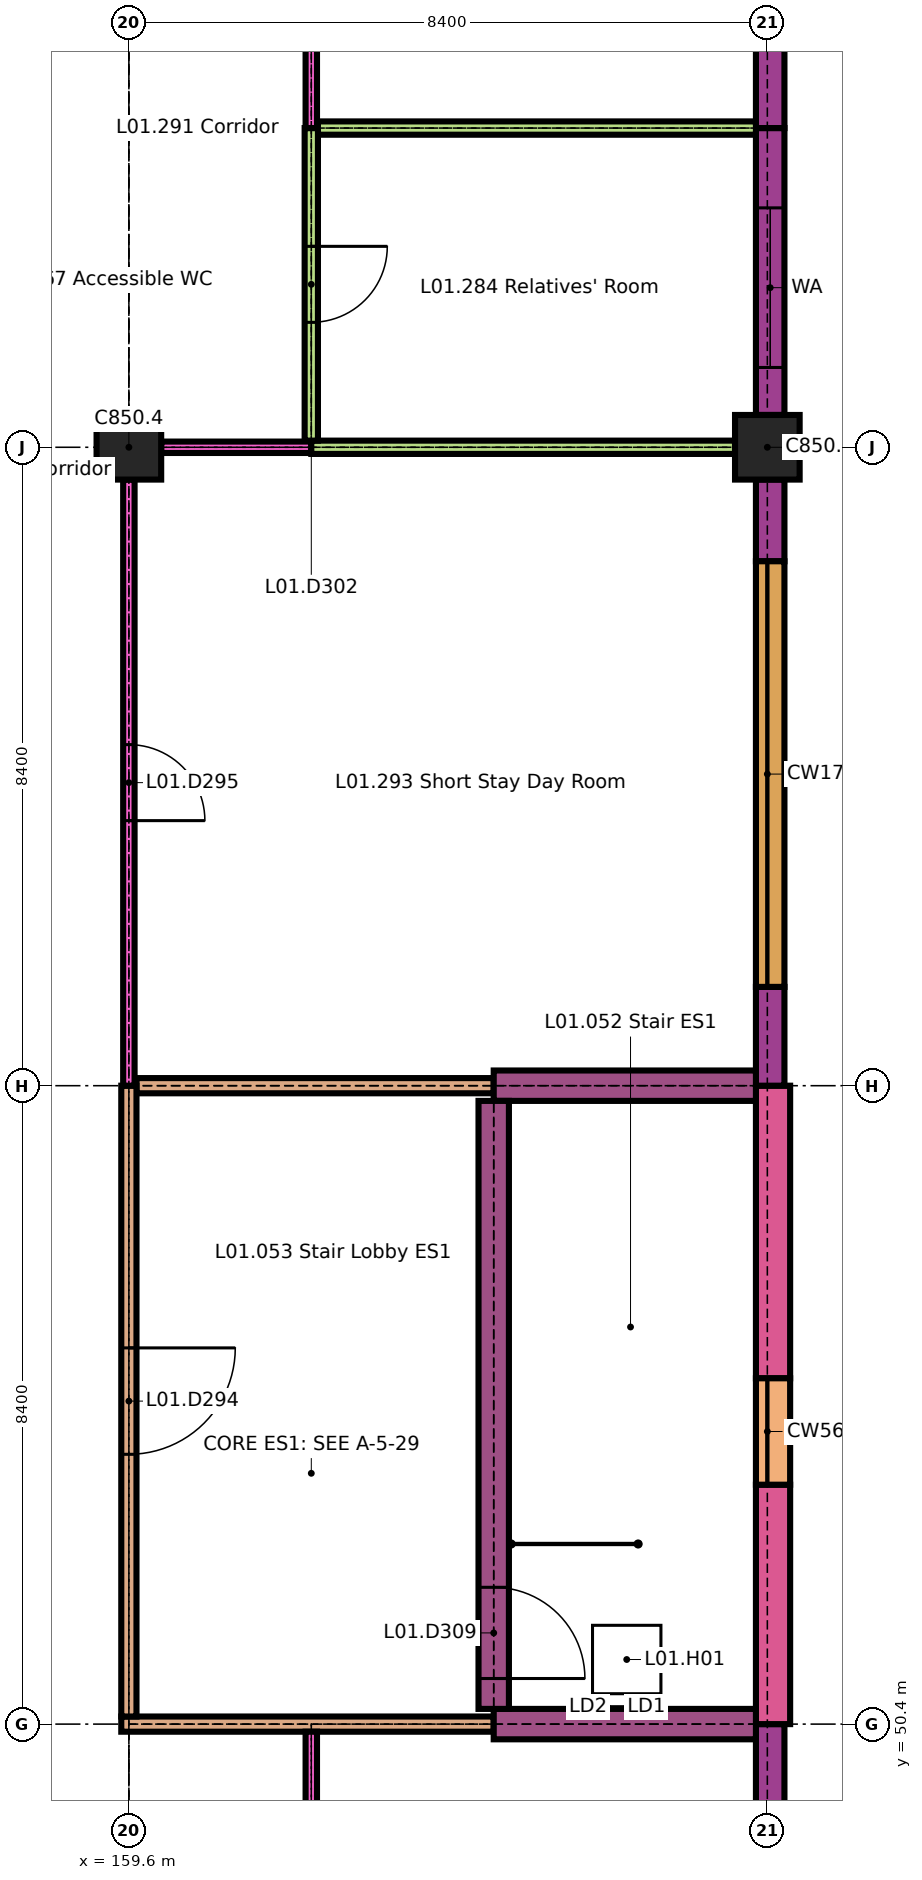
"""IFC4 building model, lengths in metres.
Left out: names, types, materials, properties, quantities, classifications, styles, units other than length and angle.
Written with IfcOpenShell. Run it as: python <this file> out.ifc"""

import sys

from ifc_helpers import new_model, si_unit, direction, frame, frame_2d, origin, origin_2d, place, context, subcontext, project, spatial, rectangle, extrude, element, fill, save


model = new_model("IFC4")
c1 = context("Model", 3, precision=1e-05, world=origin(), true_north=direction((0.0, 1.0)))
c2 = subcontext(c1, "Body", "Model", "MODEL_VIEW")
j1 = project(units=[si_unit("LENGTHUNIT", "METRE"), si_unit("PLANEANGLEUNIT", "RADIAN")], contexts=[c1])
p1 = place(None, origin())
s1 = spatial("IfcSite", under=j1, at=p1, CompositionType="ELEMENT")
p2 = place(p1, origin())
s2 = spatial("IfcBuilding", under=s1, at=p2, CompositionType="ELEMENT")
p3 = place(p2, frame((0.0, 0.0, 4.5)))
s3 = spatial("IfcBuildingStorey", under=s2, at=p3, CompositionType="ELEMENT", Elevation=4.5)
for number, where, z_axis, x_axis in (
    (1, (159.6, 67.2, 0.0), (0.0, 0.0, 1.0), (1.0, 0.0, 0.0)),
    (2, (168.0, 67.2, 0.0), (0.0, 0.0, 1.0), (1.0, 0.0, 0.0)),
):
    element("IfcColumn", number, at=place(p3, frame(where, z_axis=z_axis, x_axis=x_axis)), inside=s3, PredefinedType="COLUMN", context=c2, shape_type="SweptSolid", body=[
        extrude(rectangle(XDim=0.85, YDim=0.85, at=origin_2d()), origin(), (0.0, 0.0, 1.0), 3.45),
    ])
p4 = place(p3, frame((168.038, 42.425, 0.0), z_axis=(0.0, 0.0, 1.0), x_axis=(0.0, 1.0, 0.0)))
e3 = element("IfcWall", 3, at=p4, inside=s3, PredefinedType="SOLIDWALL", context=c2, shape_type="SweptSolid", body=[
    extrude(rectangle(XDim=7.975, YDim=0.375, at=frame_2d((3.987, 0.0))), origin(), (0.0, 0.0, 1.0), 3.15),
])
p5 = place(p4, frame((0.775, 0.0, 0.9)))
e4 = element("IfcOpeningElement", 4, at=p5, cuts=e3, PredefinedType="OPENING", context=c2, shape_type="SweptSolid", body=[
    extrude(rectangle(XDim=1.8, YDim=1.5, at=frame_2d((0.9, 0.75))), frame((0.0, 0.198, 0.0), z_axis=(0.0, -1.0, 0.0), x_axis=(1.0, 0.0, 0.0)), (0.0, 0.0, 1.0), 0.395),
])
p6 = place(p4, frame((4.975, 0.0, 0.9)))
e5 = element("IfcOpeningElement", 5, at=p6, cuts=e3, PredefinedType="OPENING", context=c2, shape_type="SweptSolid", body=[
    extrude(rectangle(XDim=1.8, YDim=1.5, at=frame_2d((0.9, 0.75))), frame((0.0, 0.198, 0.0), z_axis=(0.0, -1.0, 0.0), x_axis=(1.0, 0.0, 0.0)), (0.0, 0.0, 1.0), 0.395),
])
p7 = place(p3, frame((168.075, 50.4, 0.0), z_axis=(0.0, 0.0, 1.0), x_axis=(0.0, 1.0, 0.0)))
e6 = element("IfcWall", 6, at=p7, inside=s3, PredefinedType="SOLIDWALL", context=c2, shape_type="SweptSolid", body=[
    extrude(rectangle(XDim=3.15, YDim=0.45, at=frame_2d((1.575, 0.0))), origin(), (0.0, 0.0, 1.0), 3.6),
])
p8 = place(p3, frame((168.075, 54.95, 0.0), z_axis=(0.0, 0.0, 1.0), x_axis=(0.0, 1.0, 0.0)))
e7 = element("IfcWall", 7, at=p8, inside=s3, PredefinedType="SOLIDWALL", context=c2, shape_type="SweptSolid", body=[
    extrude(rectangle(XDim=3.85, YDim=0.45, at=frame_2d((1.925, 0.0))), origin(), (0.0, 0.0, 1.0), 3.6),
])
p9 = place(p3, frame((168.075, 53.55, 0.0), z_axis=(0.0, 0.0, 1.0), x_axis=(0.0, 1.0, 0.0)))
e8 = element("IfcWall", 8, at=p9, inside=s3, PredefinedType="SOLIDWALL", context=c2, shape_type="SweptSolid", body=[
    extrude(rectangle(XDim=1.4, YDim=0.45, at=frame_2d((0.7, 0.0))), origin(), (0.0, 0.0, 1.0), 0.6),
])
p10 = place(p3, frame((168.038, 58.8, 0.0), z_axis=(0.0, 0.0, 1.0), x_axis=(0.0, 1.0, 0.0)))
e9 = element("IfcWall", 9, at=p10, inside=s3, PredefinedType="SOLIDWALL", context=c2, shape_type="SweptSolid", body=[
    extrude(rectangle(XDim=1.3, YDim=0.375, at=frame_2d((0.65, 0.0))), origin(), (0.0, 0.0, 1.0), 3.15),
])
p11 = place(p3, frame((168.038, 65.7, 0.0), z_axis=(0.0, 0.0, 1.0), x_axis=(0.0, 1.0, 0.0)))
e10 = element("IfcWall", 10, at=p11, inside=s3, PredefinedType="SOLIDWALL", context=c2, shape_type="SweptSolid", body=[
    extrude(rectangle(XDim=1.075, YDim=0.375, at=frame_2d((0.538, 0.0))), origin(), (0.0, 0.0, 1.0), 3.15),
])
p12 = place(p3, frame((168.038, 60.1, 0.0), z_axis=(0.0, 0.0, 1.0), x_axis=(0.0, 1.0, 0.0)))
e11 = element("IfcWall", 11, at=p12, inside=s3, PredefinedType="SOLIDWALL", context=c2, shape_type="SweptSolid", body=[
    extrude(rectangle(XDim=5.6, YDim=0.375, at=frame_2d((2.8, 0.0))), origin(), (0.0, 0.0, 1.0), 0.6),
])
p13 = place(p3, frame((168.038, 67.625, 0.0), z_axis=(0.0, 0.0, 1.0), x_axis=(0.0, 1.0, 0.0)))
e12 = element("IfcWall", 12, at=p13, inside=s3, PredefinedType="SOLIDWALL", context=c2, shape_type="SweptSolid", body=[
    extrude(rectangle(XDim=3.775, YDim=0.375, at=frame_2d((1.887, 0.0))), origin(), (0.0, 0.0, 1.0), 3.15),
])
p14 = place(p13, frame((0.625, 0.0, 0.9)))
e13 = element("IfcOpeningElement", 13, at=p14, cuts=e12, PredefinedType="OPENING", context=c2, shape_type="SweptSolid", body=[
    extrude(rectangle(XDim=2.1, YDim=1.5, at=frame_2d((1.05, 0.75))), frame((0.0, 0.198, 0.0), z_axis=(0.0, -1.0, 0.0), x_axis=(1.0, 0.0, 0.0)), (0.0, 0.0, 1.0), 0.395),
])
p15 = place(p3, frame((168.038, 71.4, 0.0), z_axis=(0.0, 0.0, 1.0), x_axis=(0.0, 1.0, 0.0)))
e14 = element("IfcWall", 14, at=p15, inside=s3, PredefinedType="SOLIDWALL", context=c2, shape_type="SweptSolid", body=[
    extrude(rectangle(XDim=4.2, YDim=0.375, at=frame_2d((2.1, 0.0))), origin(), (0.0, 0.0, 1.0), 3.15),
])
p16 = place(p15, frame((1.35, 0.0, 0.9)))
e15 = element("IfcOpeningElement", 15, at=p16, cuts=e14, PredefinedType="OPENING", context=c2, shape_type="SweptSolid", body=[
    extrude(rectangle(XDim=1.5, YDim=1.5, at=frame_2d((0.75, 0.75))), frame((0.0, 0.198, 0.0), z_axis=(0.0, -1.0, 0.0), x_axis=(1.0, 0.0, 0.0)), (0.0, 0.0, 1.0), 0.395),
])
p17 = place(p3, frame((159.5, 50.4, 0.0), z_axis=(0.0, 0.0, 1.0), x_axis=(1.0, 0.0, 0.0)))
e16 = element("IfcWall", 16, at=p17, inside=s3, PredefinedType="PARTITIONING", context=c2, shape_type="SweptSolid", body=[
    extrude(rectangle(XDim=4.9, YDim=0.2, at=frame_2d((2.45, 0.0))), origin(), (0.0, 0.0, 1.0), 3.6),
])
p18 = place(p3, frame((164.4, 50.4, 0.0), z_axis=(0.0, 0.0, 1.0), x_axis=(1.0, 0.0, 0.0)))
e17 = element("IfcWall", 17, at=p18, inside=s3, PredefinedType="SHEAR", context=c2, shape_type="SweptSolid", body=[
    extrude(rectangle(XDim=3.45, YDim=0.4, at=frame_2d((1.725, 0.0))), origin(), (0.0, 0.0, 1.0), 3.6),
])
p19 = place(p3, frame((159.7, 58.8, 0.0), z_axis=(0.0, 0.0, 1.0), x_axis=(1.0, 0.0, 0.0)))
e18 = element("IfcWall", 18, at=p19, inside=s3, PredefinedType="PARTITIONING", context=c2, shape_type="SweptSolid", body=[
    extrude(rectangle(XDim=4.7, YDim=0.2, at=frame_2d((2.35, 0.0))), origin(), (0.0, 0.0, 1.0), 3.6),
])
p20 = place(p3, frame((164.4, 58.8, 0.0), z_axis=(0.0, 0.0, 1.0), x_axis=(1.0, 0.0, 0.0)))
e19 = element("IfcWall", 19, at=p20, inside=s3, PredefinedType="SHEAR", context=c2, shape_type="SweptSolid", body=[
    extrude(rectangle(XDim=3.45, YDim=0.4, at=frame_2d((1.725, 0.0))), origin(), (0.0, 0.0, 1.0), 3.6),
])
p21 = place(p3, frame((160.025, 67.2, 0.0), z_axis=(0.0, 0.0, 1.0), x_axis=(1.0, 0.0, 0.0)))
e20 = element("IfcWall", 20, at=p21, inside=s3, PredefinedType="PARTITIONING", context=c2, shape_type="SweptSolid", body=[
    extrude(rectangle(XDim=1.975, YDim=0.15, at=frame_2d((0.988, 0.0))), origin(), (0.0, 0.0, 1.0), 3.6),
])
p22 = place(p3, frame((162.0, 67.2, 0.0), z_axis=(0.0, 0.0, 1.0), x_axis=(1.0, 0.0, 0.0)))
e21 = element("IfcWall", 21, at=p22, inside=s3, PredefinedType="PARTITIONING", context=c2, shape_type="SweptSolid", body=[
    extrude(rectangle(XDim=5.575, YDim=0.175, at=frame_2d((2.788, 0.0))), origin(), (0.0, 0.0, 1.0), 3.6),
])
p23 = place(p3, frame((162.087, 71.4, 0.0), z_axis=(0.0, 0.0, 1.0), x_axis=(1.0, 0.0, 0.0)))
e22 = element("IfcWall", 22, at=p23, inside=s3, PredefinedType="PARTITIONING", context=c2, shape_type="SweptSolid", body=[
    extrude(rectangle(XDim=5.763, YDim=0.175, at=frame_2d((2.881, 0.0))), origin(), (0.0, 0.0, 1.0), 3.6),
])
p24 = place(p3, frame((159.6, 50.5, 0.0), z_axis=(0.0, 0.0, 1.0), x_axis=(0.0, 1.0, 0.0)))
e23 = element("IfcWall", 23, at=p24, inside=s3, PredefinedType="PARTITIONING", context=c2, shape_type="SweptSolid", body=[
    extrude(rectangle(XDim=8.3, YDim=0.2, at=frame_2d((4.15, 0.0))), origin(), (0.0, 0.0, 1.0), 3.6),
])
p25 = place(p24, frame((3.45, 0.0, 0.0)))
e24 = element("IfcOpeningElement", 24, at=p25, cuts=e23, PredefinedType="OPENING", context=c2, shape_type="SweptSolid", body=[
    extrude(rectangle(XDim=1.4, YDim=2.1, at=frame_2d((0.7, 1.05))), frame((0.0, 0.11, 0.0), z_axis=(0.0, -1.0, 0.0), x_axis=(1.0, 0.0, 0.0)), (0.0, 0.0, 1.0), 0.22),
])
p26 = place(p3, frame((159.6, 58.8, 0.0), z_axis=(0.0, 0.0, 1.0), x_axis=(0.0, 1.0, 0.0)))
e25 = element("IfcWall", 25, at=p26, inside=s3, PredefinedType="PARTITIONING", context=c2, shape_type="SweptSolid", body=[
    extrude(rectangle(XDim=7.975, YDim=0.15, at=frame_2d((3.987, 0.0))), origin(), (0.0, 0.0, 1.0), 3.6),
])
p27 = place(p26, frame((3.488, 0.0, 0.0)))
e26 = element("IfcOpeningElement", 26, at=p27, cuts=e25, PredefinedType="OPENING", context=c2, shape_type="SweptSolid", body=[
    extrude(rectangle(XDim=1.0, YDim=2.1, at=frame_2d((0.5, 1.05))), frame((0.0, 0.085, 0.0), z_axis=(0.0, -1.0, 0.0), x_axis=(1.0, 0.0, 0.0)), (0.0, 0.0, 1.0), 0.17),
])
p28 = place(p3, frame((162.0, 33.675, 0.0), z_axis=(0.0, 0.0, 1.0), x_axis=(0.0, 1.0, 0.0)))
e27 = element("IfcWall", 27, at=p28, inside=s3, PredefinedType="PARTITIONING", context=c2, shape_type="SweptSolid", body=[
    extrude(rectangle(XDim=16.625, YDim=0.15, at=frame_2d((8.312, 0.0))), origin(), (0.0, 0.0, 1.0), 3.6),
])
p29 = place(p28, frame((3.462, 0.0, 0.0)))
e28 = element("IfcOpeningElement", 28, at=p29, cuts=e27, PredefinedType="OPENING", context=c2, shape_type="SweptSolid", body=[
    extrude(rectangle(XDim=1.4, YDim=2.1, at=frame_2d((0.7, 1.05))), frame((0.0, 0.085, 0.0), z_axis=(0.0, -1.0, 0.0), x_axis=(1.0, 0.0, 0.0)), (0.0, 0.0, 1.0), 0.17),
])
p30 = place(p28, frame((11.775, 0.0, 0.0)))
e29 = element("IfcOpeningElement", 29, at=p30, cuts=e27, PredefinedType="OPENING", context=c2, shape_type="SweptSolid", body=[
    extrude(rectangle(XDim=1.4, YDim=2.1, at=frame_2d((0.7, 1.05))), frame((0.0, 0.085, 0.0), z_axis=(0.0, -1.0, 0.0), x_axis=(1.0, 0.0, 0.0)), (0.0, 0.0, 1.0), 0.17),
])
p31 = place(p3, frame((162.0, 67.288, 0.0), z_axis=(0.0, 0.0, 1.0), x_axis=(0.0, 1.0, 0.0)))
e30 = element("IfcWall", 30, at=p31, inside=s3, PredefinedType="PARTITIONING", context=c2, shape_type="SweptSolid", body=[
    extrude(rectangle(XDim=4.112, YDim=0.175, at=frame_2d((2.056, 0.0))), origin(), (0.0, 0.0, 1.0), 3.6),
])
p32 = place(p31, frame((1.556, 0.0, 0.0)))
e31 = element("IfcOpeningElement", 31, at=p32, cuts=e30, PredefinedType="OPENING", context=c2, shape_type="SweptSolid", body=[
    extrude(rectangle(XDim=1.0, YDim=2.1, at=frame_2d((0.5, 1.05))), frame((0.0, 0.097, 0.0), z_axis=(0.0, -1.0, 0.0), x_axis=(1.0, 0.0, 0.0)), (0.0, 0.0, 1.0), 0.195),
])
p33 = place(p3, frame((162.0, 71.4, 0.0), z_axis=(0.0, 0.0, 1.0), x_axis=(0.0, 1.0, 0.0)))
e32 = element("IfcWall", 32, at=p33, inside=s3, PredefinedType="PARTITIONING", context=c2, shape_type="SweptSolid", body=[
    extrude(rectangle(XDim=4.1, YDim=0.15, at=frame_2d((2.05, 0.0))), origin(), (0.0, 0.0, 1.0), 3.6),
])
p34 = place(p33, frame((1.55, 0.0, 0.0)))
e33 = element("IfcOpeningElement", 33, at=p34, cuts=e32, PredefinedType="OPENING", context=c2, shape_type="SweptSolid", body=[
    extrude(rectangle(XDim=1.0, YDim=2.1, at=frame_2d((0.5, 1.05))), frame((0.0, 0.085, 0.0), z_axis=(0.0, -1.0, 0.0), x_axis=(1.0, 0.0, 0.0)), (0.0, 0.0, 1.0), 0.17),
])
p35 = place(p3, frame((164.4, 50.6, 0.0), z_axis=(0.0, 0.0, 1.0), x_axis=(0.0, 1.0, 0.0)))
e34 = element("IfcWall", 34, at=p35, inside=s3, PredefinedType="SHEAR", context=c2, shape_type="SweptSolid", body=[
    extrude(rectangle(XDim=8.0, YDim=0.4, at=frame_2d((4.0, 0.0))), origin(), (0.0, 0.0, 1.0), 3.6),
])
p36 = place(p35, frame((0.4, 0.0, 0.0)))
e35 = element("IfcOpeningElement", 35, at=p36, cuts=e34, PredefinedType="OPENING", context=c2, shape_type="SweptSolid", body=[
    extrude(rectangle(XDim=1.2, YDim=2.1, at=frame_2d((0.6, 1.05))), frame((0.0, 0.21, 0.0), z_axis=(0.0, -1.0, 0.0), x_axis=(1.0, 0.0, 0.0)), (0.0, 0.0, 1.0), 0.42),
])
p37 = place(p14, origin())
e36 = element("IfcWindow", 36, at=p37, inside=s3, PartitioningType="DOUBLE_PANEL_VERTICAL", PredefinedType="WINDOW", context=c2, shape_type="SweptSolid", body=[
    extrude(rectangle(XDim=2.1, YDim=1.5, at=frame_2d((1.05, 0.75))), frame((0.0, 0.03, 0.0), z_axis=(0.0, -1.0, 0.0), x_axis=(1.0, 0.0, 0.0)), (0.0, 0.0, 1.0), 0.06),
])
fill(e13, e36)
p38 = place(p3, frame((0.0, 0.0, 3.45)))
p39 = place(p38, frame((166.15, 51.25, 0.0)))
p40 = place(p39, frame((0.0, 0.0, 0.4)))
e37 = element("IfcDoor", 37, at=p40, inside=s3, OperationType="SINGLE_SWING_LEFT", PredefinedType="TRAPDOOR", context=c2, shape_type="SweptSolid", body=[
    extrude(rectangle(XDim=0.9, YDim=0.9, at=origin_2d()), origin(), (0.0, 0.0, 1.0), 0.05),
])
p41 = place(p25, origin())
e38 = element("IfcDoor", 38, at=p41, inside=s3, OperationType="SINGLE_SWING_RIGHT", PredefinedType="DOOR", context=c2, shape_type="SweptSolid", body=[
    extrude(rectangle(XDim=1.4, YDim=2.1, at=frame_2d((0.7, 1.05))), frame((0.0, 0.03, 0.0), z_axis=(0.0, -1.0, 0.0), x_axis=(1.0, 0.0, 0.0)), (0.0, 0.0, 1.0), 0.06),
])
fill(e24, e38)
p42 = place(p27, origin())
e39 = element("IfcDoor", 39, at=p42, inside=s3, OperationType="SINGLE_SWING_LEFT", PredefinedType="DOOR", context=c2, shape_type="SweptSolid", body=[
    extrude(rectangle(XDim=1.0, YDim=2.1, at=frame_2d((0.5, 1.05))), frame((0.0, 0.025, 0.0), z_axis=(0.0, -1.0, 0.0), x_axis=(1.0, 0.0, 0.0)), (0.0, 0.0, 1.0), 0.05),
])
fill(e26, e39)
p43 = place(p32, origin())
e40 = element("IfcDoor", 40, at=p43, inside=s3, OperationType="SINGLE_SWING_RIGHT", PredefinedType="DOOR", context=c2, shape_type="SweptSolid", body=[
    extrude(rectangle(XDim=1.0, YDim=2.1, at=frame_2d((0.5, 1.05))), frame((0.0, 0.035, 0.0), z_axis=(0.0, -1.0, 0.0), x_axis=(1.0, 0.0, 0.0)), (0.0, 0.0, 1.0), 0.07),
])
fill(e31, e40)
p44 = place(p36, origin())
e41 = element("IfcDoor", 41, at=p44, inside=s3, OperationType="SINGLE_SWING_LEFT", PredefinedType="DOOR", context=c2, shape_type="SweptSolid", body=[
    extrude(rectangle(XDim=1.2, YDim=2.1, at=frame_2d((0.6, 1.05))), frame((0.0, 0.025, 0.0), z_axis=(0.0, -1.0, 0.0), x_axis=(1.0, 0.0, 0.0)), (0.0, 0.0, 1.0), 0.05),
])
fill(e35, e41)
save(model, sys.argv[1])
